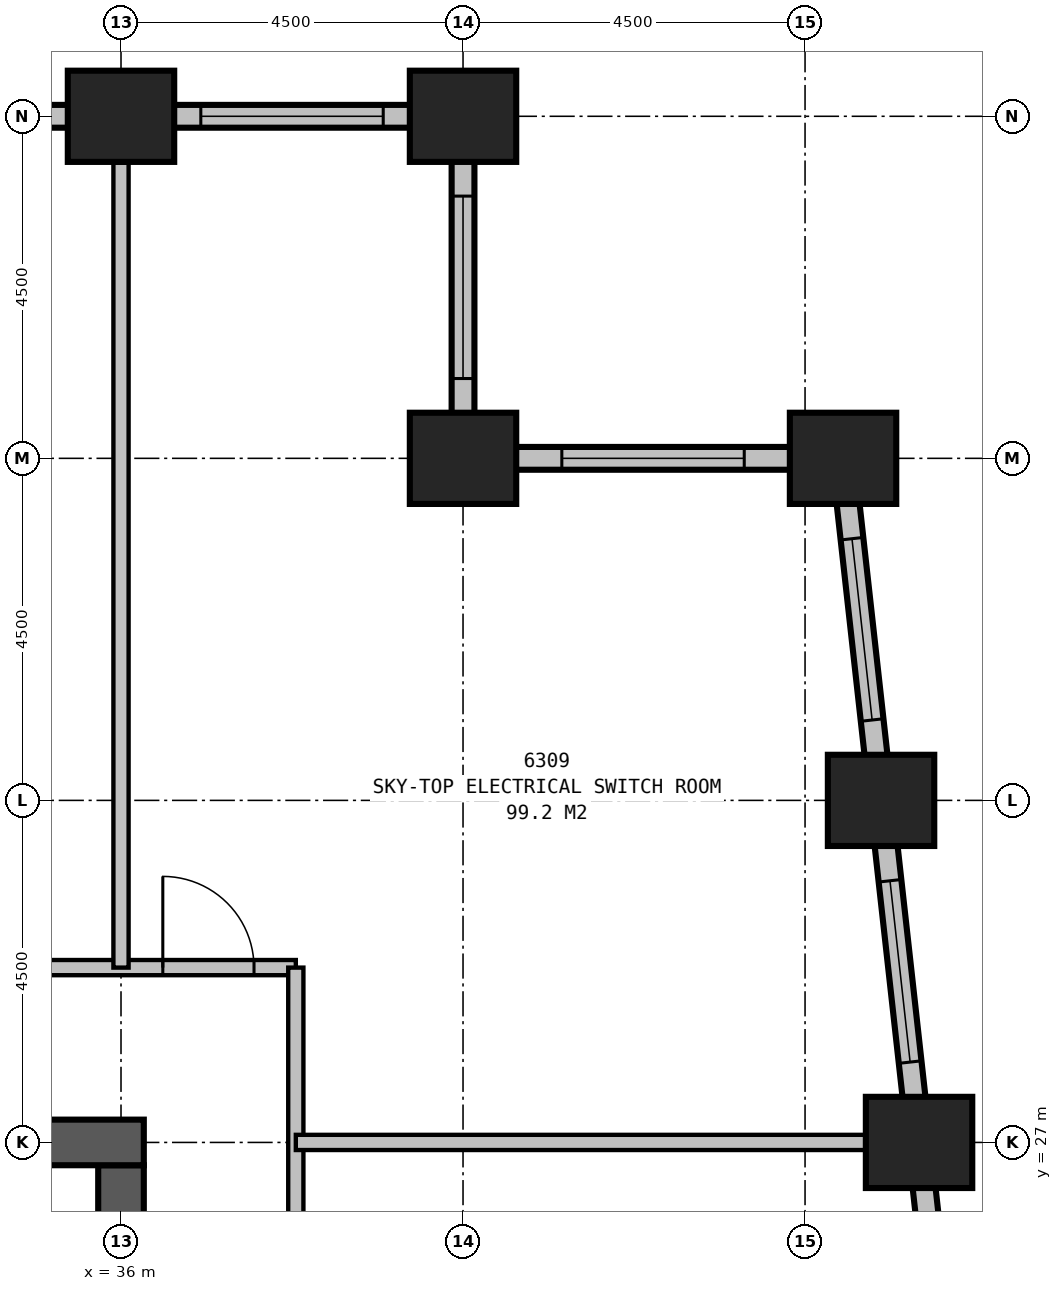
"""IFC4 building model, lengths in metres.
Left out: names, types, materials, properties, quantities, classifications, styles, units other than length and angle.
Written with IfcOpenShell. Run it as: python <this file> out.ifc"""

import sys

from ifc_helpers import new_model, si_unit, direction, frame, frame_2d, origin, origin_2d, place, context, subcontext, project, spatial, rectangle, extrude, element, fill, save


model = new_model("IFC4")
c1 = context("Model", 3, precision=1e-05, world=origin(), true_north=direction((0.0, 1.0)))
c2 = subcontext(c1, "Body", "Model", "MODEL_VIEW")
j1 = project(units=[si_unit("LENGTHUNIT", "METRE"), si_unit("PLANEANGLEUNIT", "RADIAN")], contexts=[c1])
p1 = place(None, origin())
s1 = spatial("IfcSite", under=j1, at=p1, CompositionType="ELEMENT")
p2 = place(p1, origin())
s2 = spatial("IfcBuilding", under=s1, at=p2, CompositionType="ELEMENT")
p3 = place(p2, frame((0.0, 0.0, 244.7)))
s3 = spatial("IfcBuildingStorey", under=s2, at=p3, CompositionType="ELEMENT", Elevation=244.7)
for number, where, z_axis, x_axis in (
    (1, (46.5, 27.0, 0.0), (0.0, 0.0, 1.0), (1.0, 0.0, 0.0)),
    (2, (46.0, 31.5, 0.0), (0.0, 0.0, 1.0), (1.0, 0.0, 0.0)),
    (3, (45.5, 36.0, 0.0), (0.0, 0.0, 1.0), (1.0, 0.0, 0.0)),
    (4, (40.5, 36.0, 0.0), (0.0, 0.0, 1.0), (1.0, 0.0, 0.0)),
    (5, (40.5, 40.5, 0.0), (0.0, 0.0, 1.0), (1.0, 0.0, 0.0)),
    (6, (36.0, 40.5, 0.0), (0.0, 0.0, 1.0), (1.0, 0.0, 0.0)),
):
    element("IfcColumn", number, at=place(p3, frame(where, z_axis=z_axis, x_axis=x_axis)), inside=s3, PredefinedType="COLUMN", context=c2, shape_type="SweptSolid", body=[
        extrude(rectangle(XDim=1.4, YDim=1.2, at=origin_2d()), origin(), (0.0, 0.0, 1.0), 6.0),
    ])
p4 = place(p3, frame((36.3, 27.0, 0.0), z_axis=(0.0, 0.0, 1.0), x_axis=(-1.0, 0.0, 0.0)))
e7 = element("IfcWall", 7, at=p4, inside=s3, PredefinedType="SHEAR", context=c2, shape_type="SweptSolid", body=[
    extrude(rectangle(XDim=23.6, YDim=0.6, at=frame_2d((11.8, 0.0))), origin(), (0.0, 0.0, 1.0), 6.0),
])
p5 = place(p4, frame((17.05, 0.0, 0.0)))
e8 = element("IfcOpeningElement", 8, at=p5, cuts=e7, PredefinedType="OPENING", context=c2, shape_type="SweptSolid", body=[
    extrude(rectangle(XDim=1.0, YDim=2.1, at=frame_2d((0.5, 1.05))), frame((0.0, 0.31, 0.0), z_axis=(0.0, -1.0, 0.0), x_axis=(1.0, 0.0, 0.0)), (0.0, 0.0, 1.0), 0.62),
])
p6 = place(p4, frame((12.05, 0.0, 0.0)))
e9 = element("IfcOpeningElement", 9, at=p6, cuts=e7, PredefinedType="OPENING", context=c2, shape_type="SweptSolid", body=[
    extrude(rectangle(XDim=1.0, YDim=2.1, at=frame_2d((0.5, 1.05))), frame((0.0, 0.31, 0.0), z_axis=(0.0, -1.0, 0.0), x_axis=(1.0, 0.0, 0.0)), (0.0, 0.0, 1.0), 0.62),
])
p7 = place(p4, frame((7.05, 0.0, 0.0)))
e10 = element("IfcOpeningElement", 10, at=p7, cuts=e7, PredefinedType="OPENING", context=c2, shape_type="SweptSolid", body=[
    extrude(rectangle(XDim=1.0, YDim=2.1, at=frame_2d((0.5, 1.05))), frame((0.0, 0.31, 0.0), z_axis=(0.0, -1.0, 0.0), x_axis=(1.0, 0.0, 0.0)), (0.0, 0.0, 1.0), 0.62),
])
p8 = place(p3, frame((36.0, 20.0, 0.0), z_axis=(0.0, 0.0, 1.0), x_axis=(0.0, 1.0, 0.0)))
e11 = element("IfcWall", 11, at=p8, inside=s3, PredefinedType="SHEAR", context=c2, shape_type="SweptSolid", body=[
    extrude(rectangle(XDim=6.7, YDim=0.6, at=frame_2d((3.35, 0.0))), origin(), (0.0, 0.0, 1.0), 6.0),
])
p9 = place(p3, frame((49.017, 4.351, 0.0), z_axis=(0.0, 0.0, 1.0), x_axis=(-0.110433201132, 0.993883548555, 0.0)))
e12 = element("IfcWall", 12, at=p9, inside=s3, PredefinedType="STANDARD", context=c2, shape_type="SweptSolid", body=[
    extrude(rectangle(XDim=31.994, YDim=0.3, at=frame_2d((15.997, 0.0))), origin(), (0.0, 0.0, 1.0), 4.45),
])
p10 = place(p9, frame((1.214, 0.0, 0.5)))
e13 = element("IfcOpeningElement", 13, at=p10, cuts=e12, PredefinedType="OPENING", context=c2, shape_type="SweptSolid", body=[
    extrude(rectangle(XDim=2.4, YDim=2.0, at=frame_2d((1.2, 1.0))), frame((0.0, 0.16, 0.0), z_axis=(0.0, -1.0, 0.0), x_axis=(1.0, 0.0, 0.0)), (0.0, 0.0, 1.0), 0.32),
])
p11 = place(p9, frame((5.742, 0.0, 0.5)))
e14 = element("IfcOpeningElement", 14, at=p11, cuts=e12, PredefinedType="OPENING", context=c2, shape_type="SweptSolid", body=[
    extrude(rectangle(XDim=2.4, YDim=2.0, at=frame_2d((1.2, 1.0))), frame((0.0, 0.16, 0.0), z_axis=(0.0, -1.0, 0.0), x_axis=(1.0, 0.0, 0.0)), (0.0, 0.0, 1.0), 0.32),
])
p12 = place(p9, frame((10.269, 0.0, 0.5)))
e15 = element("IfcOpeningElement", 15, at=p12, cuts=e12, PredefinedType="OPENING", context=c2, shape_type="SweptSolid", body=[
    extrude(rectangle(XDim=2.4, YDim=2.0, at=frame_2d((1.2, 1.0))), frame((0.0, 0.16, 0.0), z_axis=(0.0, -1.0, 0.0), x_axis=(1.0, 0.0, 0.0)), (0.0, 0.0, 1.0), 0.32),
])
p13 = place(p9, frame((14.797, 0.0, 0.5)))
e16 = element("IfcOpeningElement", 16, at=p13, cuts=e12, PredefinedType="OPENING", context=c2, shape_type="SweptSolid", body=[
    extrude(rectangle(XDim=2.4, YDim=2.0, at=frame_2d((1.2, 1.0))), frame((0.0, 0.16, 0.0), z_axis=(0.0, -1.0, 0.0), x_axis=(1.0, 0.0, 0.0)), (0.0, 0.0, 1.0), 0.32),
])
p14 = place(p9, frame((19.325, 0.0, 0.5)))
e17 = element("IfcOpeningElement", 17, at=p14, cuts=e12, PredefinedType="OPENING", context=c2, shape_type="SweptSolid", body=[
    extrude(rectangle(XDim=2.4, YDim=2.0, at=frame_2d((1.2, 1.0))), frame((0.0, 0.16, 0.0), z_axis=(0.0, -1.0, 0.0), x_axis=(1.0, 0.0, 0.0)), (0.0, 0.0, 1.0), 0.32),
])
p15 = place(p9, frame((23.852, 0.0, 0.5)))
e18 = element("IfcOpeningElement", 18, at=p15, cuts=e12, PredefinedType="OPENING", context=c2, shape_type="SweptSolid", body=[
    extrude(rectangle(XDim=2.4, YDim=2.0, at=frame_2d((1.2, 1.0))), frame((0.0, 0.16, 0.0), z_axis=(0.0, -1.0, 0.0), x_axis=(1.0, 0.0, 0.0)), (0.0, 0.0, 1.0), 0.32),
])
p16 = place(p9, frame((28.38, 0.0, 0.5)))
e19 = element("IfcOpeningElement", 19, at=p16, cuts=e12, PredefinedType="OPENING", context=c2, shape_type="SweptSolid", body=[
    extrude(rectangle(XDim=2.4, YDim=2.0, at=frame_2d((1.2, 1.0))), frame((0.0, 0.16, 0.0), z_axis=(0.0, -1.0, 0.0), x_axis=(1.0, 0.0, 0.0)), (0.0, 0.0, 1.0), 0.32),
])
p17 = place(p3, frame((45.65, 36.0, 0.0), z_axis=(0.0, 0.0, 1.0), x_axis=(-1.0, 0.0, 0.0)))
e20 = element("IfcWall", 20, at=p17, inside=s3, PredefinedType="STANDARD", context=c2, shape_type="SweptSolid", body=[
    extrude(rectangle(XDim=5.3, YDim=0.3, at=frame_2d((2.65, 0.0))), origin(), (0.0, 0.0, 1.0), 4.45),
])
p18 = place(p17, frame((1.45, 0.0, 0.5)))
e21 = element("IfcOpeningElement", 21, at=p18, cuts=e20, PredefinedType="OPENING", context=c2, shape_type="SweptSolid", body=[
    extrude(rectangle(XDim=2.4, YDim=2.0, at=frame_2d((1.2, 1.0))), frame((0.0, 0.16, 0.0), z_axis=(0.0, -1.0, 0.0), x_axis=(1.0, 0.0, 0.0)), (0.0, 0.0, 1.0), 0.32),
])
p19 = place(p3, frame((40.5, 35.85, 0.0), z_axis=(0.0, 0.0, 1.0), x_axis=(0.0, 1.0, 0.0)))
e22 = element("IfcWall", 22, at=p19, inside=s3, PredefinedType="STANDARD", context=c2, shape_type="SweptSolid", body=[
    extrude(rectangle(XDim=4.8, YDim=0.3, at=frame_2d((2.4, 0.0))), origin(), (0.0, 0.0, 1.0), 4.45),
])
p20 = place(p19, frame((1.2, 0.0, 0.5)))
e23 = element("IfcOpeningElement", 23, at=p20, cuts=e22, PredefinedType="OPENING", context=c2, shape_type="SweptSolid", body=[
    extrude(rectangle(XDim=2.4, YDim=2.0, at=frame_2d((1.2, 1.0))), frame((0.0, 0.16, 0.0), z_axis=(0.0, -1.0, 0.0), x_axis=(1.0, 0.0, 0.0)), (0.0, 0.0, 1.0), 0.32),
])
p21 = place(p3, frame((40.65, 40.5, 0.0), z_axis=(0.0, 0.0, 1.0), x_axis=(-1.0, 0.0, 0.0)))
e24 = element("IfcWall", 24, at=p21, inside=s3, PredefinedType="STANDARD", context=c2, shape_type="SweptSolid", body=[
    extrude(rectangle(XDim=27.3, YDim=0.3, at=frame_2d((13.65, 0.0))), origin(), (0.0, 0.0, 1.0), 4.45),
])
p22 = place(p21, frame((1.2, 0.0, 0.5)))
e25 = element("IfcOpeningElement", 25, at=p22, cuts=e24, PredefinedType="OPENING", context=c2, shape_type="SweptSolid", body=[
    extrude(rectangle(XDim=2.4, YDim=2.0, at=frame_2d((1.2, 1.0))), frame((0.0, 0.16, 0.0), z_axis=(0.0, -1.0, 0.0), x_axis=(1.0, 0.0, 0.0)), (0.0, 0.0, 1.0), 0.32),
])
p23 = place(p21, frame((5.7, 0.0, 0.5)))
e26 = element("IfcOpeningElement", 26, at=p23, cuts=e24, PredefinedType="OPENING", context=c2, shape_type="SweptSolid", body=[
    extrude(rectangle(XDim=2.4, YDim=2.0, at=frame_2d((1.2, 1.0))), frame((0.0, 0.16, 0.0), z_axis=(0.0, -1.0, 0.0), x_axis=(1.0, 0.0, 0.0)), (0.0, 0.0, 1.0), 0.32),
])
p24 = place(p21, frame((10.2, 0.0, 0.5)))
e27 = element("IfcOpeningElement", 27, at=p24, cuts=e24, PredefinedType="OPENING", context=c2, shape_type="SweptSolid", body=[
    extrude(rectangle(XDim=2.4, YDim=2.0, at=frame_2d((1.2, 1.0))), frame((0.0, 0.16, 0.0), z_axis=(0.0, -1.0, 0.0), x_axis=(1.0, 0.0, 0.0)), (0.0, 0.0, 1.0), 0.32),
])
p25 = place(p21, frame((14.7, 0.0, 0.5)))
e28 = element("IfcOpeningElement", 28, at=p25, cuts=e24, PredefinedType="OPENING", context=c2, shape_type="SweptSolid", body=[
    extrude(rectangle(XDim=2.4, YDim=2.0, at=frame_2d((1.2, 1.0))), frame((0.0, 0.16, 0.0), z_axis=(0.0, -1.0, 0.0), x_axis=(1.0, 0.0, 0.0)), (0.0, 0.0, 1.0), 0.32),
])
p26 = place(p21, frame((19.2, 0.0, 0.5)))
e29 = element("IfcOpeningElement", 29, at=p26, cuts=e24, PredefinedType="OPENING", context=c2, shape_type="SweptSolid", body=[
    extrude(rectangle(XDim=2.4, YDim=2.0, at=frame_2d((1.2, 1.0))), frame((0.0, 0.16, 0.0), z_axis=(0.0, -1.0, 0.0), x_axis=(1.0, 0.0, 0.0)), (0.0, 0.0, 1.0), 0.32),
])
p27 = place(p21, frame((23.7, 0.0, 0.5)))
e30 = element("IfcOpeningElement", 30, at=p27, cuts=e24, PredefinedType="OPENING", context=c2, shape_type="SweptSolid", body=[
    extrude(rectangle(XDim=2.4, YDim=2.0, at=frame_2d((1.2, 1.0))), frame((0.0, 0.16, 0.0), z_axis=(0.0, -1.0, 0.0), x_axis=(1.0, 0.0, 0.0)), (0.0, 0.0, 1.0), 0.32),
])
p28 = place(p3, frame((38.3, 11.2, 0.0), z_axis=(0.0, 0.0, 1.0), x_axis=(0.0, 1.0, 0.0)))
e31 = element("IfcWall", 31, at=p28, inside=s3, PredefinedType="PARTITIONING", context=c2, shape_type="SweptSolid", body=[
    extrude(rectangle(XDim=18.1, YDim=0.2, at=frame_2d((9.05, 0.0))), origin(), (0.0, 0.0, 1.0), 5.75),
])
p29 = place(p28, frame((4.0, 0.0, 0.0), z_axis=(0.0, 0.0, 1.0), x_axis=(-1.0, 0.0, 0.0)))
e32 = element("IfcOpeningElement", 32, at=p29, cuts=e31, PredefinedType="OPENING", context=c2, shape_type="SweptSolid", body=[
    extrude(rectangle(XDim=1.0, YDim=2.1, at=frame_2d((0.5, 1.05))), frame((0.0, 0.11, 0.0), z_axis=(0.0, -1.0, 0.0), x_axis=(1.0, 0.0, 0.0)), (0.0, 0.0, 1.0), 0.22),
])
p30 = place(p28, frame((6.1, 0.0, 0.0), z_axis=(0.0, 0.0, 1.0), x_axis=(-1.0, 0.0, 0.0)))
e33 = element("IfcOpeningElement", 33, at=p30, cuts=e31, PredefinedType="OPENING", context=c2, shape_type="SweptSolid", body=[
    extrude(rectangle(XDim=1.0, YDim=2.1, at=frame_2d((0.5, 1.05))), frame((0.0, 0.11, 0.0), z_axis=(0.0, -1.0, 0.0), x_axis=(1.0, 0.0, 0.0)), (0.0, 0.0, 1.0), 0.22),
])
p31 = place(p28, frame((8.45, 0.0, 0.0), z_axis=(0.0, 0.0, 1.0), x_axis=(-1.0, 0.0, 0.0)))
e34 = element("IfcOpeningElement", 34, at=p31, cuts=e31, PredefinedType="OPENING", context=c2, shape_type="SweptSolid", body=[
    extrude(rectangle(XDim=1.2, YDim=2.1, at=frame_2d((0.6, 1.05))), frame((0.0, 0.11, 0.0), z_axis=(0.0, -1.0, 0.0), x_axis=(1.0, 0.0, 0.0)), (0.0, 0.0, 1.0), 0.22),
])
p32 = place(p3, frame((13.0, 29.3, 0.0), z_axis=(0.0, 0.0, 1.0), x_axis=(1.0, 0.0, 0.0)))
e35 = element("IfcWall", 35, at=p32, inside=s3, PredefinedType="PARTITIONING", context=c2, shape_type="SweptSolid", body=[
    extrude(rectangle(XDim=25.3, YDim=0.2, at=frame_2d((12.65, 0.0))), origin(), (0.0, 0.0, 1.0), 5.75),
])
p33 = place(p32, frame((0.95, 0.0, 0.0)))
e36 = element("IfcOpeningElement", 36, at=p33, cuts=e35, PredefinedType="OPENING", context=c2, shape_type="SweptSolid", body=[
    extrude(rectangle(XDim=1.2, YDim=2.1, at=frame_2d((0.6, 1.05))), frame((0.0, 0.11, 0.0), z_axis=(0.0, -1.0, 0.0), x_axis=(1.0, 0.0, 0.0)), (0.0, 0.0, 1.0), 0.22),
])
p34 = place(p32, frame((9.95, 0.0, 0.0)))
e37 = element("IfcOpeningElement", 37, at=p34, cuts=e35, PredefinedType="OPENING", context=c2, shape_type="SweptSolid", body=[
    extrude(rectangle(XDim=1.0, YDim=2.1, at=frame_2d((0.5, 1.05))), frame((0.0, 0.11, 0.0), z_axis=(0.0, -1.0, 0.0), x_axis=(1.0, 0.0, 0.0)), (0.0, 0.0, 1.0), 0.22),
])
p35 = place(p32, frame((14.45, 0.0, 0.0)))
e38 = element("IfcOpeningElement", 38, at=p35, cuts=e35, PredefinedType="OPENING", context=c2, shape_type="SweptSolid", body=[
    extrude(rectangle(XDim=1.2, YDim=2.1, at=frame_2d((0.6, 1.05))), frame((0.0, 0.11, 0.0), z_axis=(0.0, -1.0, 0.0), x_axis=(1.0, 0.0, 0.0)), (0.0, 0.0, 1.0), 0.22),
])
p36 = place(p32, frame((23.55, 0.0, 0.0)))
e39 = element("IfcOpeningElement", 39, at=p36, cuts=e35, PredefinedType="OPENING", context=c2, shape_type="SweptSolid", body=[
    extrude(rectangle(XDim=1.2, YDim=2.1, at=frame_2d((0.6, 1.05))), frame((0.0, 0.11, 0.0), z_axis=(0.0, -1.0, 0.0), x_axis=(1.0, 0.0, 0.0)), (0.0, 0.0, 1.0), 0.22),
])
p37 = place(p3, frame((38.3, 27.0, 0.0), z_axis=(0.0, 0.0, 1.0), x_axis=(1.0, 0.0, 0.0)))
e40 = element("IfcWall", 40, at=p37, inside=s3, PredefinedType="PARTITIONING", context=c2, shape_type="SweptSolid", body=[
    extrude(rectangle(XDim=7.499, YDim=0.2, at=frame_2d((3.75, 0.0))), origin(), (0.0, 0.0, 1.0), 4.45),
])
p38 = place(p3, frame((36.0, 29.3, 0.0), z_axis=(0.0, 0.0, 1.0), x_axis=(0.0, 1.0, 0.0)))
e41 = element("IfcWall", 41, at=p38, inside=s3, PredefinedType="PARTITIONING", context=c2, shape_type="SweptSolid", body=[
    extrude(rectangle(XDim=10.59, YDim=0.2, at=frame_2d((5.295, 0.0))), origin(), (0.0, 0.0, 1.0), 4.75),
])
p39 = place(p15, origin())
e42 = element("IfcWindow", 42, at=p39, inside=s3, PartitioningType="SINGLE_PANEL", PredefinedType="USERDEFINED", context=c2, shape_type="SweptSolid", body=[
    extrude(rectangle(XDim=2.4, YDim=2.0, at=frame_2d((1.2, 1.0))), frame((0.0, 0.03, 0.0), z_axis=(0.0, -1.0, 0.0), x_axis=(1.0, 0.0, 0.0)), (0.0, 0.0, 1.0), 0.06),
])
fill(e18, e42)
p40 = place(p16, origin())
e43 = element("IfcWindow", 43, at=p40, inside=s3, PartitioningType="SINGLE_PANEL", PredefinedType="USERDEFINED", context=c2, shape_type="SweptSolid", body=[
    extrude(rectangle(XDim=2.4, YDim=2.0, at=frame_2d((1.2, 1.0))), frame((0.0, 0.03, 0.0), z_axis=(0.0, -1.0, 0.0), x_axis=(1.0, 0.0, 0.0)), (0.0, 0.0, 1.0), 0.06),
])
fill(e19, e43)
p41 = place(p18, origin())
e44 = element("IfcWindow", 44, at=p41, inside=s3, PartitioningType="SINGLE_PANEL", PredefinedType="USERDEFINED", context=c2, shape_type="SweptSolid", body=[
    extrude(rectangle(XDim=2.4, YDim=2.0, at=frame_2d((1.2, 1.0))), frame((0.0, 0.03, 0.0), z_axis=(0.0, -1.0, 0.0), x_axis=(1.0, 0.0, 0.0)), (0.0, 0.0, 1.0), 0.06),
])
fill(e21, e44)
p42 = place(p20, origin())
e45 = element("IfcWindow", 45, at=p42, inside=s3, PartitioningType="SINGLE_PANEL", PredefinedType="USERDEFINED", context=c2, shape_type="SweptSolid", body=[
    extrude(rectangle(XDim=2.4, YDim=2.0, at=frame_2d((1.2, 1.0))), frame((0.0, 0.03, 0.0), z_axis=(0.0, -1.0, 0.0), x_axis=(1.0, 0.0, 0.0)), (0.0, 0.0, 1.0), 0.06),
])
fill(e23, e45)
p43 = place(p22, origin())
e46 = element("IfcWindow", 46, at=p43, inside=s3, PartitioningType="SINGLE_PANEL", PredefinedType="USERDEFINED", context=c2, shape_type="SweptSolid", body=[
    extrude(rectangle(XDim=2.4, YDim=2.0, at=frame_2d((1.2, 1.0))), frame((0.0, 0.03, 0.0), z_axis=(0.0, -1.0, 0.0), x_axis=(1.0, 0.0, 0.0)), (0.0, 0.0, 1.0), 0.06),
])
fill(e25, e46)
p44 = place(p36, origin())
e47 = element("IfcDoor", 47, at=p44, inside=s3, OperationType="SINGLE_SWING_LEFT", PredefinedType="DOOR", context=c2, shape_type="SweptSolid", body=[
    extrude(rectangle(XDim=1.2, YDim=2.1, at=frame_2d((0.6, 1.05))), frame((0.0, 0.025, 0.0), z_axis=(0.0, -1.0, 0.0), x_axis=(1.0, 0.0, 0.0)), (0.0, 0.0, 1.0), 0.05),
])
fill(e39, e47)
save(model, sys.argv[1])
